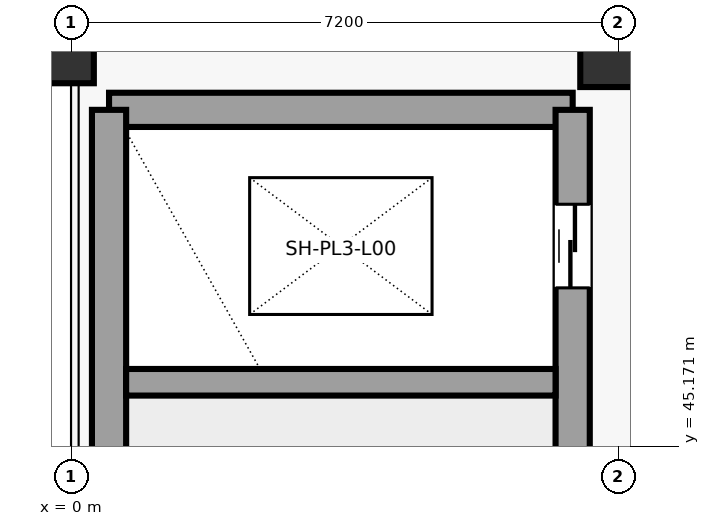
"""IFC4 building model, lengths in metres.
Left out: names, types, materials, properties, quantities, classifications, styles, units other than length and angle.
Written with IfcOpenShell. Run it as: python <this file> out.ifc"""

import sys

from ifc_helpers import new_model, si_unit, direction, frame, frame_2d, origin, origin_2d, place, context, subcontext, project, spatial, rectangle, circle, extrude, element, fill, save


model = new_model("IFC4")
c1 = context("Model", 3, precision=1e-05, world=origin(), true_north=direction((0.0, 1.0)))
c2 = subcontext(c1, "Body", "Model", "MODEL_VIEW")
j1 = project(units=[si_unit("LENGTHUNIT", "METRE"), si_unit("PLANEANGLEUNIT", "RADIAN")], contexts=[c1])
p1 = place(None, origin())
s1 = spatial("IfcSite", under=j1, at=p1, CompositionType="ELEMENT")
p2 = place(p1, origin())
s2 = spatial("IfcBuilding", under=s1, at=p2, CompositionType="ELEMENT")
p3 = place(p2, origin())
s3 = spatial("IfcBuildingStorey", under=s2, at=p3, CompositionType="ELEMENT", Elevation=0.0)
p4 = place(p3, frame((0.0, 50.4, 0.0), z_axis=(0.0, 0.0, 1.0), x_axis=(1.0, 0.0, 0.0)))
e1 = element("IfcColumn", 1, at=p4, inside=s3, PredefinedType="COLUMN", context=c2, shape_type="SweptSolid", body=[
    extrude(rectangle(XDim=0.6, YDim=0.9, at=origin_2d()), origin(), (0.0, 0.0, 1.0), 5.4),
])
p5 = place(p3, frame((7.2, 50.4, 0.0), z_axis=(0.0, 0.0, 1.0), x_axis=(1.0, 0.0, 0.0)))
e2 = element("IfcColumn", 2, at=p5, inside=s3, PredefinedType="COLUMN", context=c2, shape_type="SweptSolid", body=[
    extrude(circle(Radius=0.5, at=origin_2d()), origin(), (0.0, 0.0, 1.0), 5.4),
])
p6 = place(p3, frame((0.5, 49.6, 0.0), z_axis=(0.0, 0.0, 1.0), x_axis=(1.0, 0.0, 0.0)))
e3 = element("IfcWall", 3, at=p6, inside=s3, PredefinedType="SHEAR", context=c2, shape_type="SweptSolid", body=[
    extrude(rectangle(XDim=6.1, YDim=0.45, at=frame_2d((3.05, 0.0))), origin(), (0.0, 0.0, 1.0), 5.06),
])
p7 = place(p3, frame((0.5, 36.8, 0.0), z_axis=(0.0, 0.0, 1.0), x_axis=(0.0, 1.0, 0.0)))
e4 = element("IfcWall", 4, at=p7, inside=s3, PredefinedType="SHEAR", context=c2, shape_type="SweptSolid", body=[
    extrude(rectangle(XDim=12.8, YDim=0.45, at=frame_2d((6.4, 0.0))), origin(), (0.0, 0.0, 1.0), 5.06),
])
p8 = place(p7, frame((0.55, 0.0, 0.0)))
e5 = element("IfcOpeningElement", 5, at=p8, cuts=e4, PredefinedType="OPENING", context=c2, shape_type="SweptSolid", body=[
    extrude(rectangle(XDim=1.5, YDim=2.25, at=frame_2d((0.75, 1.125))), frame((0.0, 0.235, 0.0), z_axis=(0.0, -1.0, 0.0), x_axis=(1.0, 0.0, 0.0)), (0.0, 0.0, 1.0), 0.47),
])
p9 = place(p3, frame((6.6, 36.8, 0.0), z_axis=(0.0, 0.0, 1.0), x_axis=(0.0, 1.0, 0.0)))
e6 = element("IfcWall", 6, at=p9, inside=s3, PredefinedType="SHEAR", context=c2, shape_type="SweptSolid", body=[
    extrude(rectangle(XDim=12.8, YDim=0.45, at=frame_2d((6.4, 0.0))), origin(), (0.0, 0.0, 1.0), 5.06),
])
p10 = place(p9, frame((0.55, 0.0, 0.0)))
e7 = element("IfcOpeningElement", 7, at=p10, cuts=e6, PredefinedType="OPENING", context=c2, shape_type="SweptSolid", body=[
    extrude(rectangle(XDim=1.2, YDim=2.25, at=frame_2d((0.6, 1.125))), frame((0.0, 0.235, 0.0), z_axis=(0.0, -1.0, 0.0), x_axis=(1.0, 0.0, 0.0)), (0.0, 0.0, 1.0), 0.47),
])
p11 = place(p9, frame((10.458, 0.0, 0.0)))
e8 = element("IfcOpeningElement", 8, at=p11, cuts=e6, PredefinedType="OPENING", context=c2, shape_type="SweptSolid", body=[
    extrude(rectangle(XDim=1.1, YDim=2.2, at=frame_2d((0.55, 1.1))), frame((0.0, 0.235, 0.0), z_axis=(0.0, -1.0, 0.0), x_axis=(1.0, 0.0, 0.0)), (0.0, 0.0, 1.0), 0.47),
])
p12 = place(p3, frame((0.725, 46.016, 0.0), z_axis=(0.0, 0.0, 1.0), x_axis=(1.0, 0.0, 0.0)))
e9 = element("IfcWall", 9, at=p12, inside=s3, PredefinedType="SHEAR", context=c2, shape_type="SweptSolid", body=[
    extrude(rectangle(XDim=5.65, YDim=0.35, at=frame_2d((2.825, 0.0))), origin(), (0.0, 0.0, 1.0), 5.06),
])
p13 = place(p11, origin())
e10 = element("IfcDoor", 10, at=p13, inside=s3, OperationType="SLIDING_TO_RIGHT", PredefinedType="DOOR", context=c2, shape_type="SweptSolid", body=[
    extrude(rectangle(XDim=1.1, YDim=2.2, at=frame_2d((0.55, 1.1))), frame((0.0, 0.025, 0.0), z_axis=(0.0, -1.0, 0.0), x_axis=(1.0, 0.0, 0.0)), (0.0, 0.0, 1.0), 0.05),
])
fill(e8, e10)
save(model, sys.argv[1])
